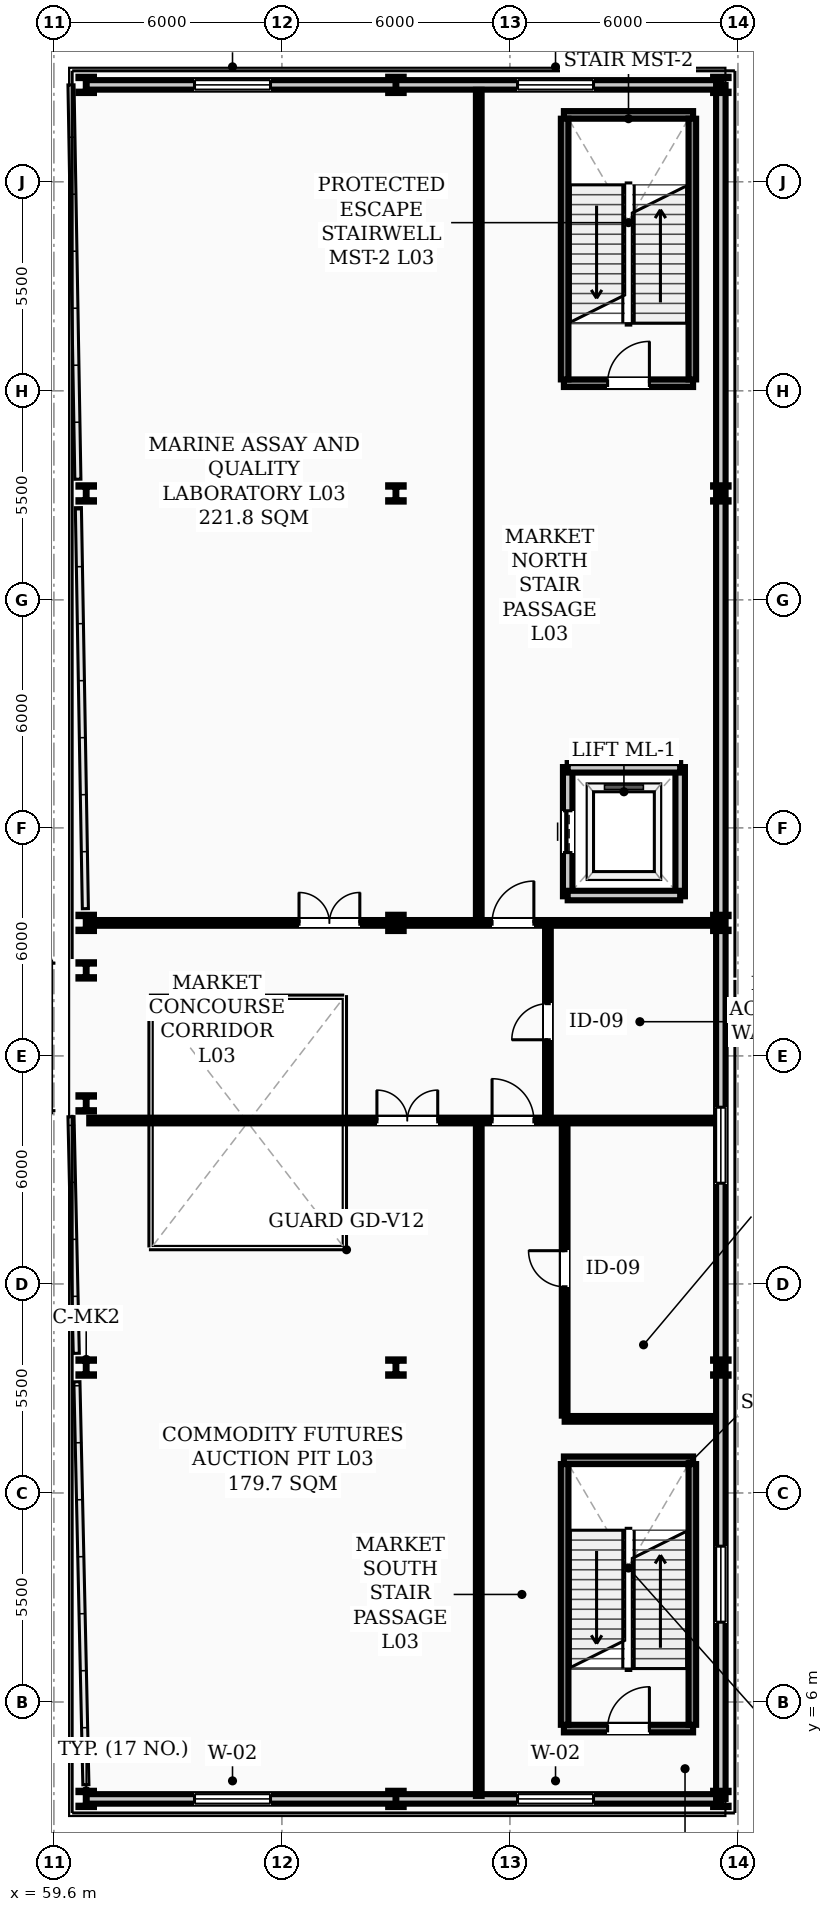
"""IFC4 building model, lengths in metres.
Left out: names, types, materials, properties, quantities, classifications, styles, units other than length and angle.
Written with IfcOpenShell. Run it as: python <this file> out.ifc"""

import sys

from ifc_helpers import new_model, si_unit, direction, frame, frame_2d, origin, origin_2d, place, context, subcontext, project, spatial, rectangle, i_section, extrude, element, fill, save


model = new_model("IFC4")
c1 = context("Model", 3, precision=1e-05, world=origin(), true_north=direction((0.0, 1.0)))
c2 = subcontext(c1, "Body", "Model", "MODEL_VIEW")
j1 = project(units=[si_unit("LENGTHUNIT", "METRE"), si_unit("PLANEANGLEUNIT", "RADIAN")], contexts=[c1])
p1 = place(None, origin())
s1 = spatial("IfcSite", under=j1, at=p1, CompositionType="ELEMENT")
p2 = place(p1, origin())
s2 = spatial("IfcBuilding", under=s1, at=p2, CompositionType="ELEMENT")
p3 = place(p2, frame((0.0, 0.0, 11.2)))
s3 = spatial("IfcBuildingStorey", under=s2, at=p3, CompositionType="ELEMENT", Elevation=11.2)
for number, where, z_axis, x_axis in (
    (1, (60.45, 3.45, 0.0), (0.0, 0.0, 1.0), (1.0, 0.0, 0.0)),
    (2, (60.45, 14.8, 0.0), (0.0, 0.0, 1.0), (1.0, 0.0, 0.0)),
    (3, (60.45, 21.75, 0.0), (0.0, 0.0, 1.0), (1.0, 0.0, 0.0)),
    (4, (60.45, 25.25, 0.0), (0.0, 0.0, 1.0), (1.0, 0.0, 0.0)),
    (5, (60.45, 26.5, 0.0), (0.0, 0.0, 1.0), (1.0, 0.0, 0.0)),
    (6, (60.45, 37.8, 0.0), (0.0, 0.0, 1.0), (1.0, 0.0, 0.0)),
    (7, (60.45, 48.55, 0.0), (0.0, 0.0, 1.0), (1.0, 0.0, 0.0)),
    (8, (68.6, 3.45, 0.0), (0.0, 0.0, 1.0), (1.0, 0.0, 0.0)),
    (9, (68.6, 14.8, 0.0), (0.0, 0.0, 1.0), (1.0, 0.0, 0.0)),
    (10, (68.6, 26.5, 0.0), (0.0, 0.0, 1.0), (1.0, 0.0, 0.0)),
    (11, (68.6, 37.8, 0.0), (0.0, 0.0, 1.0), (1.0, 0.0, 0.0)),
    (12, (68.6, 48.55, 0.0), (0.0, 0.0, 1.0), (1.0, 0.0, 0.0)),
    (13, (77.15, 3.45, 0.0), (0.0, 0.0, 1.0), (1.0, 0.0, 0.0)),
    (14, (77.15, 14.8, 0.0), (0.0, 0.0, 1.0), (1.0, 0.0, 0.0)),
    (15, (77.15, 26.5, 0.0), (0.0, 0.0, 1.0), (1.0, 0.0, 0.0)),
    (16, (77.15, 37.8, 0.0), (0.0, 0.0, 1.0), (1.0, 0.0, 0.0)),
    (17, (77.15, 48.55, 0.0), (0.0, 0.0, 1.0), (1.0, 0.0, 0.0)),
):
    element("IfcColumn", number, at=place(p3, frame(where, z_axis=z_axis, x_axis=x_axis)), inside=s3, PredefinedType="COLUMN", context=c2, shape_type="SweptSolid", body=[
        extrude(i_section(OverallWidth=0.407, OverallDepth=0.428, WebThickness=0.02, FlangeThickness=0.035, FilletRadius=0.022, at=origin_2d()), origin(), (0.0, 0.0, 1.0), 5.4),
    ])
p4 = place(p3, frame((60.45, 3.45, 0.0), z_axis=(0.0, 0.0, 1.0), x_axis=(1.0, 0.0, 0.0)))
e18 = element("IfcWall", 18, at=p4, inside=s3, PredefinedType="STANDARD", context=c2, shape_type="SweptSolid", body=[
    extrude(rectangle(XDim=16.7, YDim=0.25, at=frame_2d((8.35, 0.0))), origin(), (0.0, 0.0, 1.0), 4.5),
])
p5 = place(p4, frame((2.85, 0.0, 0.95)))
e19 = element("IfcOpeningElement", 19, at=p5, cuts=e18, PredefinedType="OPENING", context=c2, shape_type="SweptSolid", body=[
    extrude(rectangle(XDim=2.0, YDim=1.8, at=frame_2d((1.0, 0.9))), frame((0.0, 0.135, 0.0), z_axis=(0.0, -1.0, 0.0), x_axis=(1.0, 0.0, 0.0)), (0.0, 0.0, 1.0), 0.27),
])
p6 = place(p4, frame((11.35, 0.0, 0.95)))
e20 = element("IfcOpeningElement", 20, at=p6, cuts=e18, PredefinedType="OPENING", context=c2, shape_type="SweptSolid", body=[
    extrude(rectangle(XDim=2.0, YDim=1.8, at=frame_2d((1.0, 0.9))), frame((0.0, 0.135, 0.0), z_axis=(0.0, -1.0, 0.0), x_axis=(1.0, 0.0, 0.0)), (0.0, 0.0, 1.0), 0.27),
])
p7 = place(p3, frame((60.45, 48.55, 0.0), z_axis=(0.0, 0.0, 1.0), x_axis=(1.0, 0.0, 0.0)))
e21 = element("IfcWall", 21, at=p7, inside=s3, PredefinedType="STANDARD", context=c2, shape_type="SweptSolid", body=[
    extrude(rectangle(XDim=16.7, YDim=0.25, at=frame_2d((8.35, 0.0))), origin(), (0.0, 0.0, 1.0), 4.5),
])
p8 = place(p7, frame((2.85, 0.0, 0.95)))
e22 = element("IfcOpeningElement", 22, at=p8, cuts=e21, PredefinedType="OPENING", context=c2, shape_type="SweptSolid", body=[
    extrude(rectangle(XDim=2.0, YDim=1.8, at=frame_2d((1.0, 0.9))), frame((0.0, 0.135, 0.0), z_axis=(0.0, -1.0, 0.0), x_axis=(1.0, 0.0, 0.0)), (0.0, 0.0, 1.0), 0.27),
])
p9 = place(p7, frame((11.35, 0.0, 0.95)))
e23 = element("IfcOpeningElement", 23, at=p9, cuts=e21, PredefinedType="OPENING", context=c2, shape_type="SweptSolid", body=[
    extrude(rectangle(XDim=2.0, YDim=1.8, at=frame_2d((1.0, 0.9))), frame((0.0, 0.135, 0.0), z_axis=(0.0, -1.0, 0.0), x_axis=(1.0, 0.0, 0.0)), (0.0, 0.0, 1.0), 0.27),
])
p10 = place(p3, frame((77.15, 3.45, 0.0), z_axis=(0.0, 0.0, 1.0), x_axis=(0.0, 1.0, 0.0)))
e24 = element("IfcWall", 24, at=p10, inside=s3, PredefinedType="STANDARD", context=c2, shape_type="SweptSolid", body=[
    extrude(rectangle(XDim=45.1, YDim=0.25, at=frame_2d((22.55, 0.0))), origin(), (0.0, 0.0, 1.0), 4.5),
])
p11 = place(p10, frame((4.65, 0.0, 0.95)))
e25 = element("IfcOpeningElement", 25, at=p11, cuts=e24, PredefinedType="OPENING", context=c2, shape_type="SweptSolid", body=[
    extrude(rectangle(XDim=2.0, YDim=1.8, at=frame_2d((1.0, 0.9))), frame((0.0, 0.135, 0.0), z_axis=(0.0, -1.0, 0.0), x_axis=(1.0, 0.0, 0.0)), (0.0, 0.0, 1.0), 0.27),
])
p12 = place(p10, frame((16.2, 0.0, 0.95)))
e26 = element("IfcOpeningElement", 26, at=p12, cuts=e24, PredefinedType="OPENING", context=c2, shape_type="SweptSolid", body=[
    extrude(rectangle(XDim=2.0, YDim=1.8, at=frame_2d((1.0, 0.9))), frame((0.0, 0.135, 0.0), z_axis=(0.0, -1.0, 0.0), x_axis=(1.0, 0.0, 0.0)), (0.0, 0.0, 1.0), 0.27),
])
p13 = place(p3, frame((73.02, 5.3, 0.0), z_axis=(0.0, 0.0, 1.0), x_axis=(1.0, 0.0, 0.0)))
e27 = element("IfcWall", 27, at=p13, inside=s3, PredefinedType="STANDARD", context=c2, shape_type="SweptSolid", body=[
    extrude(rectangle(XDim=3.4, YDim=0.2, at=frame_2d((1.7, 0.0))), origin(), (0.0, 0.0, 1.0), 5.18),
])
p14 = place(p13, frame((1.15, 0.0, 0.0)))
e28 = element("IfcOpeningElement", 28, at=p14, cuts=e27, PredefinedType="OPENING", context=c2, shape_type="SweptSolid", body=[
    extrude(rectangle(XDim=1.1, YDim=2.08, at=frame_2d((0.55, 1.04))), frame((0.0, 0.11, 0.0), z_axis=(0.0, -1.0, 0.0), x_axis=(1.0, 0.0, 0.0)), (0.0, 0.0, 1.0), 0.22),
])
p15 = place(p3, frame((73.02, 12.36, 0.0), z_axis=(0.0, 0.0, 1.0), x_axis=(1.0, 0.0, 0.0)))
e29 = element("IfcWall", 29, at=p15, inside=s3, PredefinedType="STANDARD", context=c2, shape_type="SweptSolid", body=[
    extrude(rectangle(XDim=3.4, YDim=0.2, at=frame_2d((1.7, 0.0))), origin(), (0.0, 0.0, 1.0), 5.18),
])
for number, where, z_axis, x_axis in (
    (30, (73.04, 5.4, 0.0), (0.0, 0.0, 1.0), (0.0, 1.0, 0.0)),
    (31, (76.4, 5.4, 0.0), (0.0, 0.0, 1.0), (0.0, 1.0, 0.0)),
):
    element("IfcWall", number, at=place(p3, frame(where, z_axis=z_axis, x_axis=x_axis)), inside=s3, PredefinedType="STANDARD", context=c2, shape_type="SweptSolid", body=[
        extrude(rectangle(XDim=6.86, YDim=0.2, at=frame_2d((3.43, 0.0))), origin(), (0.0, 0.0, 1.0), 5.18),
    ])
p16 = place(p3, frame((73.02, 40.7, 0.0), z_axis=(0.0, 0.0, 1.0), x_axis=(1.0, 0.0, 0.0)))
e32 = element("IfcWall", 32, at=p16, inside=s3, PredefinedType="STANDARD", context=c2, shape_type="SweptSolid", body=[
    extrude(rectangle(XDim=3.4, YDim=0.2, at=frame_2d((1.7, 0.0))), origin(), (0.0, 0.0, 1.0), 5.18),
])
p17 = place(p16, frame((1.15, 0.0, 0.0)))
e33 = element("IfcOpeningElement", 33, at=p17, cuts=e32, PredefinedType="OPENING", context=c2, shape_type="SweptSolid", body=[
    extrude(rectangle(XDim=1.1, YDim=2.08, at=frame_2d((0.55, 1.04))), frame((0.0, 0.11, 0.0), z_axis=(0.0, -1.0, 0.0), x_axis=(1.0, 0.0, 0.0)), (0.0, 0.0, 1.0), 0.22),
])
p18 = place(p3, frame((73.02, 47.76, 0.0), z_axis=(0.0, 0.0, 1.0), x_axis=(1.0, 0.0, 0.0)))
e34 = element("IfcWall", 34, at=p18, inside=s3, PredefinedType="STANDARD", context=c2, shape_type="SweptSolid", body=[
    extrude(rectangle(XDim=3.4, YDim=0.2, at=frame_2d((1.7, 0.0))), origin(), (0.0, 0.0, 1.0), 5.18),
])
for number, where, z_axis, x_axis in (
    (35, (73.04, 40.8, 0.0), (0.0, 0.0, 1.0), (0.0, 1.0, 0.0)),
    (36, (76.4, 40.8, 0.0), (0.0, 0.0, 1.0), (0.0, 1.0, 0.0)),
):
    element("IfcWall", number, at=place(p3, frame(where, z_axis=z_axis, x_axis=x_axis)), inside=s3, PredefinedType="STANDARD", context=c2, shape_type="SweptSolid", body=[
        extrude(rectangle(XDim=6.86, YDim=0.2, at=frame_2d((3.43, 0.0))), origin(), (0.0, 0.0, 1.0), 5.18),
    ])
p19 = place(p3, frame((73.12, 27.2, 0.0), z_axis=(0.0, 0.0, 1.0), x_axis=(0.0, 1.0, 0.0)))
e37 = element("IfcWall", 37, at=p19, inside=s3, PredefinedType="STANDARD", context=c2, shape_type="SweptSolid", body=[
    extrude(rectangle(XDim=3.4, YDim=0.25, at=frame_2d((1.7, 0.0))), origin(), (0.0, 0.0, 1.0), 5.15),
])
p20 = place(p19, frame((1.15, 0.0, 0.0)))
e38 = element("IfcOpeningElement", 38, at=p20, cuts=e37, PredefinedType="OPENING", context=c2, shape_type="SweptSolid", body=[
    extrude(rectangle(XDim=1.1, YDim=2.08, at=frame_2d((0.55, 1.04))), frame((0.0, 0.135, 0.0), z_axis=(0.0, -1.0, 0.0), x_axis=(1.0, 0.0, 0.0)), (0.0, 0.0, 1.0), 0.27),
])
p21 = place(p3, frame((76.08, 27.2, 0.0), z_axis=(0.0, 0.0, 1.0), x_axis=(0.0, 1.0, 0.0)))
e39 = element("IfcWall", 39, at=p21, inside=s3, PredefinedType="STANDARD", context=c2, shape_type="SweptSolid", body=[
    extrude(rectangle(XDim=3.4, YDim=0.25, at=frame_2d((1.7, 0.0))), origin(), (0.0, 0.0, 1.0), 5.15),
])
for number, where, z_axis, x_axis in (
    (40, (73.12, 27.22, 0.0), (0.0, 0.0, 1.0), (1.0, 0.0, 0.0)),
    (41, (73.12, 30.58, 0.0), (0.0, 0.0, 1.0), (1.0, 0.0, 0.0)),
):
    element("IfcWall", number, at=place(p3, frame(where, z_axis=z_axis, x_axis=x_axis)), inside=s3, PredefinedType="STANDARD", context=c2, shape_type="SweptSolid", body=[
        extrude(rectangle(XDim=2.96, YDim=0.25, at=frame_2d((1.48, 0.0))), origin(), (0.0, 0.0, 1.0), 5.15),
    ])
p22 = place(p3, frame((60.53, 21.3, 0.0), z_axis=(0.0, 0.0, 1.0), x_axis=(1.0, 0.0, 0.0)))
e42 = element("IfcWall", 42, at=p22, inside=s3, PredefinedType="PARTITIONING", context=c2, shape_type="SweptSolid", body=[
    extrude(rectangle(XDim=16.49, YDim=0.15, at=frame_2d((8.245, 0.0))), origin(), (0.0, 0.0, 1.0), 3.91),
])
p23 = place(p22, frame((7.57, 0.0, 0.0)))
e43 = element("IfcOpeningElement", 43, at=p23, cuts=e42, PredefinedType="OPENING", context=c2, shape_type="SweptSolid", body=[
    extrude(rectangle(XDim=1.6, YDim=2.08, at=frame_2d((0.8, 1.04))), frame((0.0, 0.085, 0.0), z_axis=(0.0, -1.0, 0.0), x_axis=(1.0, 0.0, 0.0)), (0.0, 0.0, 1.0), 0.17),
])
p24 = place(p22, frame((10.6, 0.0, 0.0)))
e44 = element("IfcOpeningElement", 44, at=p24, cuts=e42, PredefinedType="OPENING", context=c2, shape_type="SweptSolid", body=[
    extrude(rectangle(XDim=1.1, YDim=2.08, at=frame_2d((0.55, 1.04))), frame((0.0, 0.085, 0.0), z_axis=(0.0, -1.0, 0.0), x_axis=(1.0, 0.0, 0.0)), (0.0, 0.0, 1.0), 0.17),
])
p25 = place(p3, frame((60.53, 26.5, 0.0), z_axis=(0.0, 0.0, 1.0), x_axis=(1.0, 0.0, 0.0)))
e45 = element("IfcWall", 45, at=p25, inside=s3, PredefinedType="PARTITIONING", context=c2, shape_type="SweptSolid", body=[
    extrude(rectangle(XDim=16.49, YDim=0.15, at=frame_2d((8.245, 0.0))), origin(), (0.0, 0.0, 1.0), 4.56),
])
p26 = place(p25, frame((5.52, 0.0, 0.0)))
e46 = element("IfcOpeningElement", 46, at=p26, cuts=e45, PredefinedType="OPENING", context=c2, shape_type="SweptSolid", body=[
    extrude(rectangle(XDim=1.6, YDim=2.08, at=frame_2d((0.8, 1.04))), frame((0.0, 0.085, 0.0), z_axis=(0.0, -1.0, 0.0), x_axis=(1.0, 0.0, 0.0)), (0.0, 0.0, 1.0), 0.17),
])
p27 = place(p25, frame((10.6, 0.0, 0.0)))
e47 = element("IfcOpeningElement", 47, at=p27, cuts=e45, PredefinedType="OPENING", context=c2, shape_type="SweptSolid", body=[
    extrude(rectangle(XDim=1.1, YDim=2.08, at=frame_2d((0.55, 1.04))), frame((0.0, 0.085, 0.0), z_axis=(0.0, -1.0, 0.0), x_axis=(1.0, 0.0, 0.0)), (0.0, 0.0, 1.0), 0.17),
])
p28 = place(p3, frame((73.04, 13.45, 0.0), z_axis=(0.0, 0.0, 1.0), x_axis=(1.0, 0.0, 0.0)))
e48 = element("IfcWall", 48, at=p28, inside=s3, PredefinedType="PARTITIONING", context=c2, shape_type="SweptSolid", body=[
    extrude(rectangle(XDim=3.98, YDim=0.15, at=frame_2d((1.99, 0.0))), origin(), (0.0, 0.0, 1.0), 4.56),
])
p29 = place(p3, frame((72.6, 21.385, 0.0), z_axis=(0.0, 0.0, 1.0), x_axis=(0.0, 1.0, 0.0)))
e49 = element("IfcWall", 49, at=p29, inside=s3, PredefinedType="PARTITIONING", context=c2, shape_type="SweptSolid", body=[
    extrude(rectangle(XDim=5.03, YDim=0.15, at=frame_2d((2.515, 0.0))), origin(), (0.0, 0.0, 1.0), 4.56),
])
p30 = place(p29, frame((2.04, 0.0, 0.0)))
e50 = element("IfcOpeningElement", 50, at=p30, cuts=e49, PredefinedType="OPENING", context=c2, shape_type="SweptSolid", body=[
    extrude(rectangle(XDim=0.95, YDim=2.08, at=frame_2d((0.475, 1.04))), frame((0.0, 0.085, 0.0), z_axis=(0.0, -1.0, 0.0), x_axis=(1.0, 0.0, 0.0)), (0.0, 0.0, 1.0), 0.17),
])
p31 = place(p3, frame((70.78, 3.53, 0.0), z_axis=(0.0, 0.0, 1.0), x_axis=(0.0, 1.0, 0.0)))
e51 = element("IfcWall", 51, at=p31, inside=s3, PredefinedType="PARTITIONING", context=c2, shape_type="SweptSolid", body=[
    extrude(rectangle(XDim=17.685, YDim=0.15, at=frame_2d((8.843, 0.0))), origin(), (0.0, 0.0, 1.0), 4.56),
])
p32 = place(p3, frame((70.78, 26.585, 0.0), z_axis=(0.0, 0.0, 1.0), x_axis=(0.0, 1.0, 0.0)))
e52 = element("IfcWall", 52, at=p32, inside=s3, PredefinedType="PARTITIONING", context=c2, shape_type="SweptSolid", body=[
    extrude(rectangle(XDim=21.835, YDim=0.15, at=frame_2d((10.917, 0.0))), origin(), (0.0, 0.0, 1.0), 4.56),
])
p33 = place(p3, frame((73.04, 13.535, 0.0), z_axis=(0.0, 0.0, 1.0), x_axis=(0.0, 1.0, 0.0)))
e53 = element("IfcWall", 53, at=p33, inside=s3, PredefinedType="PARTITIONING", context=c2, shape_type="SweptSolid", body=[
    extrude(rectangle(XDim=7.68, YDim=0.15, at=frame_2d((3.84, 0.0))), origin(), (0.0, 0.0, 1.0), 4.56),
])
p34 = place(p33, frame((3.39, 0.0, 0.0)))
e54 = element("IfcOpeningElement", 54, at=p34, cuts=e53, PredefinedType="OPENING", context=c2, shape_type="SweptSolid", body=[
    extrude(rectangle(XDim=0.95, YDim=2.08, at=frame_2d((0.475, 1.04))), frame((0.0, 0.085, 0.0), z_axis=(0.0, -1.0, 0.0), x_axis=(1.0, 0.0, 0.0)), (0.0, 0.0, 1.0), 0.17),
])
p35 = place(p5, origin())
e55 = element("IfcWindow", 55, at=p35, inside=s3, PartitioningType="SINGLE_PANEL", PredefinedType="WINDOW", context=c2, shape_type="SweptSolid", body=[
    extrude(rectangle(XDim=2.0, YDim=1.8, at=frame_2d((1.0, 0.9))), frame((0.0, 0.03, 0.0), z_axis=(0.0, -1.0, 0.0), x_axis=(1.0, 0.0, 0.0)), (0.0, 0.0, 1.0), 0.06),
])
fill(e19, e55)
p36 = place(p8, origin())
e56 = element("IfcWindow", 56, at=p36, inside=s3, PartitioningType="SINGLE_PANEL", PredefinedType="WINDOW", context=c2, shape_type="SweptSolid", body=[
    extrude(rectangle(XDim=2.0, YDim=1.8, at=frame_2d((1.0, 0.9))), frame((0.0, 0.03, 0.0), z_axis=(0.0, -1.0, 0.0), x_axis=(1.0, 0.0, 0.0)), (0.0, 0.0, 1.0), 0.06),
])
fill(e22, e56)
p37 = place(p6, origin())
e57 = element("IfcWindow", 57, at=p37, inside=s3, PartitioningType="SINGLE_PANEL", PredefinedType="WINDOW", context=c2, shape_type="SweptSolid", body=[
    extrude(rectangle(XDim=2.0, YDim=1.8, at=frame_2d((1.0, 0.9))), frame((0.0, 0.03, 0.0), z_axis=(0.0, -1.0, 0.0), x_axis=(1.0, 0.0, 0.0)), (0.0, 0.0, 1.0), 0.06),
])
fill(e20, e57)
p38 = place(p9, origin())
e58 = element("IfcWindow", 58, at=p38, inside=s3, PartitioningType="SINGLE_PANEL", PredefinedType="WINDOW", context=c2, shape_type="SweptSolid", body=[
    extrude(rectangle(XDim=2.0, YDim=1.8, at=frame_2d((1.0, 0.9))), frame((0.0, 0.03, 0.0), z_axis=(0.0, -1.0, 0.0), x_axis=(1.0, 0.0, 0.0)), (0.0, 0.0, 1.0), 0.06),
])
fill(e23, e58)
p39 = place(p11, origin())
e59 = element("IfcWindow", 59, at=p39, inside=s3, PartitioningType="SINGLE_PANEL", PredefinedType="WINDOW", context=c2, shape_type="SweptSolid", body=[
    extrude(rectangle(XDim=2.0, YDim=1.8, at=frame_2d((1.0, 0.9))), frame((0.0, 0.03, 0.0), z_axis=(0.0, -1.0, 0.0), x_axis=(1.0, 0.0, 0.0)), (0.0, 0.0, 1.0), 0.06),
])
fill(e25, e59)
p40 = place(p12, origin())
e60 = element("IfcWindow", 60, at=p40, inside=s3, PartitioningType="SINGLE_PANEL", PredefinedType="WINDOW", context=c2, shape_type="SweptSolid", body=[
    extrude(rectangle(XDim=2.0, YDim=1.8, at=frame_2d((1.0, 0.9))), frame((0.0, 0.03, 0.0), z_axis=(0.0, -1.0, 0.0), x_axis=(1.0, 0.0, 0.0)), (0.0, 0.0, 1.0), 0.06),
])
fill(e26, e60)
p41 = place(p14, origin())
e61 = element("IfcDoor", 61, at=p41, inside=s3, OperationType="SINGLE_SWING_RIGHT", PredefinedType="DOOR", context=c2, shape_type="SweptSolid", body=[
    extrude(rectangle(XDim=1.1, YDim=2.08, at=frame_2d((0.55, 1.04))), frame((0.0, 0.025, 0.0), z_axis=(0.0, -1.0, 0.0), x_axis=(1.0, 0.0, 0.0)), (0.0, 0.0, 1.0), 0.05),
])
fill(e28, e61)
p42 = place(p17, origin())
e62 = element("IfcDoor", 62, at=p42, inside=s3, OperationType="SINGLE_SWING_RIGHT", PredefinedType="DOOR", context=c2, shape_type="SweptSolid", body=[
    extrude(rectangle(XDim=1.1, YDim=2.08, at=frame_2d((0.55, 1.04))), frame((0.0, 0.025, 0.0), z_axis=(0.0, -1.0, 0.0), x_axis=(1.0, 0.0, 0.0)), (0.0, 0.0, 1.0), 0.05),
])
fill(e33, e62)
p43 = place(p23, origin())
e63 = element("IfcDoor", 63, at=p43, inside=s3, OperationType="DOUBLE_DOOR_SINGLE_SWING", PredefinedType="DOOR", context=c2, shape_type="SweptSolid", body=[
    extrude(rectangle(XDim=1.6, YDim=2.08, at=frame_2d((0.8, 1.04))), frame((0.0, 0.025, 0.0), z_axis=(0.0, -1.0, 0.0), x_axis=(1.0, 0.0, 0.0)), (0.0, 0.0, 1.0), 0.05),
])
fill(e43, e63)
p44 = place(p26, origin())
e64 = element("IfcDoor", 64, at=p44, inside=s3, OperationType="DOUBLE_DOOR_SINGLE_SWING", PredefinedType="DOOR", context=c2, shape_type="SweptSolid", body=[
    extrude(rectangle(XDim=1.6, YDim=2.08, at=frame_2d((0.8, 1.04))), frame((0.0, 0.025, 0.0), z_axis=(0.0, -1.0, 0.0), x_axis=(1.0, 0.0, 0.0)), (0.0, 0.0, 1.0), 0.05),
])
fill(e46, e64)
p45 = place(p24, origin())
e65 = element("IfcDoor", 65, at=p45, inside=s3, OperationType="SINGLE_SWING_LEFT", PredefinedType="DOOR", context=c2, shape_type="SweptSolid", body=[
    extrude(rectangle(XDim=1.1, YDim=2.08, at=frame_2d((0.55, 1.04))), frame((0.0, 0.025, 0.0), z_axis=(0.0, -1.0, 0.0), x_axis=(1.0, 0.0, 0.0)), (0.0, 0.0, 1.0), 0.05),
])
fill(e44, e65)
p46 = place(p27, origin())
e66 = element("IfcDoor", 66, at=p46, inside=s3, OperationType="SINGLE_SWING_RIGHT", PredefinedType="DOOR", context=c2, shape_type="SweptSolid", body=[
    extrude(rectangle(XDim=1.1, YDim=2.08, at=frame_2d((0.55, 1.04))), frame((0.0, 0.025, 0.0), z_axis=(0.0, -1.0, 0.0), x_axis=(1.0, 0.0, 0.0)), (0.0, 0.0, 1.0), 0.05),
])
fill(e47, e66)
p47 = place(p30, origin())
e67 = element("IfcDoor", 67, at=p47, inside=s3, OperationType="SINGLE_SWING_LEFT", PredefinedType="DOOR", context=c2, shape_type="SweptSolid", body=[
    extrude(rectangle(XDim=0.95, YDim=2.08, at=frame_2d((0.475, 1.04))), frame((0.0, 0.025, 0.0), z_axis=(0.0, -1.0, 0.0), x_axis=(1.0, 0.0, 0.0)), (0.0, 0.0, 1.0), 0.05),
])
fill(e50, e67)
p48 = place(p34, origin())
e68 = element("IfcDoor", 68, at=p48, inside=s3, OperationType="SINGLE_SWING_RIGHT", PredefinedType="DOOR", context=c2, shape_type="SweptSolid", body=[
    extrude(rectangle(XDim=0.95, YDim=2.08, at=frame_2d((0.475, 1.04))), frame((0.0, 0.025, 0.0), z_axis=(0.0, -1.0, 0.0), x_axis=(1.0, 0.0, 0.0)), (0.0, 0.0, 1.0), 0.05),
])
fill(e54, e68)
p49 = place(p20, origin())
e69 = element("IfcDoor", 69, at=p49, inside=s3, OperationType="SLIDING_TO_LEFT", PredefinedType="DOOR", context=c2, shape_type="SweptSolid", body=[
    extrude(rectangle(XDim=1.1, YDim=2.08, at=frame_2d((0.55, 1.04))), frame((0.0, 0.025, 0.0), z_axis=(0.0, -1.0, 0.0), x_axis=(1.0, 0.0, 0.0)), (0.0, 0.0, 1.0), 0.05),
])
fill(e38, e69)
save(model, sys.argv[1])
